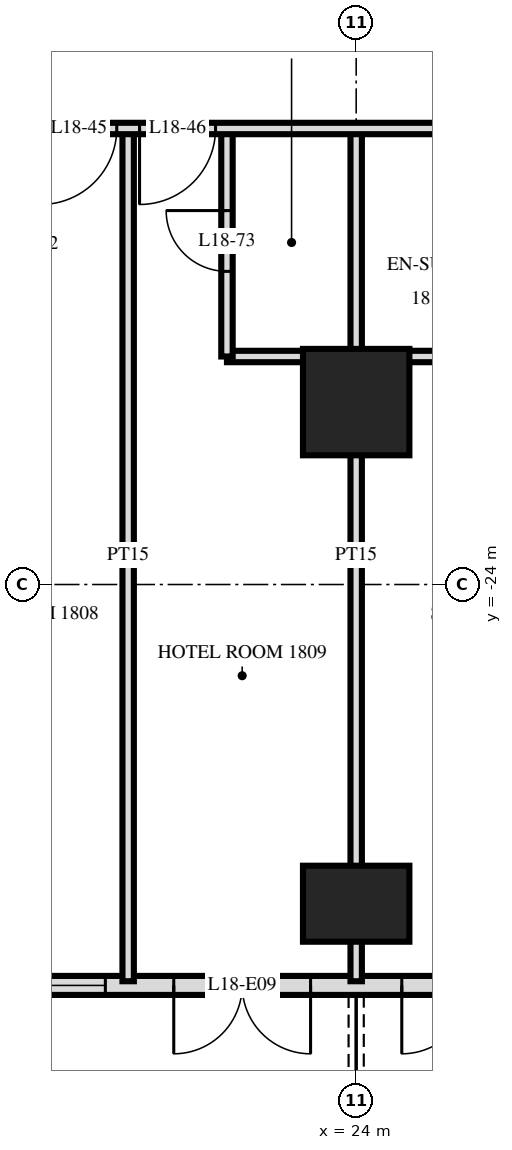
"""IFC4 building model, lengths in metres.
Left out: names, types, materials, properties, quantities, classifications, styles, units other than length and angle.
Written with IfcOpenShell. Run it as: python <this file> out.ifc"""

import sys

from ifc_helpers import new_model, si_unit, direction, frame, frame_2d, origin, origin_2d, place, context, subcontext, project, spatial, rectangle, extrude, element, fill, save


model = new_model("IFC4")
c1 = context("Model", 3, precision=1e-05, world=origin(), true_north=direction((0.0, 1.0)))
c2 = subcontext(c1, "Body", "Model", "MODEL_VIEW")
j1 = project(units=[si_unit("LENGTHUNIT", "METRE"), si_unit("PLANEANGLEUNIT", "RADIAN")], contexts=[c1])
p1 = place(None, origin())
s1 = spatial("IfcSite", under=j1, at=p1, CompositionType="ELEMENT")
p2 = place(p1, origin())
s2 = spatial("IfcBuilding", under=s1, at=p2, CompositionType="ELEMENT")
p3 = place(p2, frame((0.0, 0.0, 74.4)))
s3 = spatial("IfcBuildingStorey", under=s2, at=p3, CompositionType="ELEMENT", Elevation=74.4)
p4 = place(p3, frame((24.0, -28.2, 0.0), z_axis=(0.0, 0.0, 1.0), x_axis=(1.0, 0.0, 0.0)))
e1 = element("IfcColumn", 1, at=p4, inside=s3, PredefinedType="COLUMN", context=c2, shape_type="SweptSolid", body=[
    extrude(rectangle(XDim=1.4, YDim=1.0, at=origin_2d()), origin(), (0.0, 0.0, 1.0), 3.6),
])
p5 = place(p3, frame((24.0, -21.6, 0.0), z_axis=(0.0, 0.0, 1.0), x_axis=(1.0, 0.0, 0.0)))
e2 = element("IfcColumn", 2, at=p5, inside=s3, PredefinedType="COLUMN", context=c2, shape_type="SweptSolid", body=[
    extrude(rectangle(XDim=1.4, YDim=1.4, at=origin_2d()), origin(), (0.0, 0.0, 1.0), 3.6),
])
p6 = place(p3, frame((-28.775, -29.275, 0.0), z_axis=(0.0, 0.0, 1.0), x_axis=(1.0, 0.0, 0.0)))
e3 = element("IfcWall", 3, at=p6, inside=s3, PredefinedType="SOLIDWALL", context=c2, shape_type="SweptSolid", body=[
    extrude(rectangle(XDim=57.551, YDim=0.25, at=frame_2d((28.775, 0.0))), origin(), (0.0, 0.0, 1.0), 3.32),
])
p7 = place(p6, frame((0.575, 0.0, 0.0)))
e4 = element("IfcOpeningElement", 4, at=p7, cuts=e3, PredefinedType="OPENING", context=c2, shape_type="SweptSolid", body=[
    extrude(rectangle(XDim=1.8, YDim=2.4, at=frame_2d((0.9, 1.2))), frame((0.0, 0.135, 0.0), z_axis=(0.0, -1.0, 0.0), x_axis=(1.0, 0.0, 0.0)), (0.0, 0.0, 1.0), 0.27),
])
p8 = place(p6, frame((5.075, 0.0, 0.3)))
e5 = element("IfcOpeningElement", 5, at=p8, cuts=e3, PredefinedType="OPENING", context=c2, shape_type="SweptSolid", body=[
    extrude(rectangle(XDim=2.4, YDim=2.1, at=frame_2d((1.2, 1.05))), frame((0.0, 0.135, 0.0), z_axis=(0.0, -1.0, 0.0), x_axis=(1.0, 0.0, 0.0)), (0.0, 0.0, 1.0), 0.27),
])
p9 = place(p6, frame((8.375, 0.0, 0.0)))
e6 = element("IfcOpeningElement", 6, at=p9, cuts=e3, PredefinedType="OPENING", context=c2, shape_type="SweptSolid", body=[
    extrude(rectangle(XDim=1.8, YDim=2.4, at=frame_2d((0.9, 1.2))), frame((0.0, 0.135, 0.0), z_axis=(0.0, -1.0, 0.0), x_axis=(1.0, 0.0, 0.0)), (0.0, 0.0, 1.0), 0.27),
])
p10 = place(p6, frame((11.375, 0.0, 0.0)))
e7 = element("IfcOpeningElement", 7, at=p10, cuts=e3, PredefinedType="OPENING", context=c2, shape_type="SweptSolid", body=[
    extrude(rectangle(XDim=1.8, YDim=2.4, at=frame_2d((0.9, 1.2))), frame((0.0, 0.135, 0.0), z_axis=(0.0, -1.0, 0.0), x_axis=(1.0, 0.0, 0.0)), (0.0, 0.0, 1.0), 0.27),
])
p11 = place(p6, frame((14.075, 0.0, 0.3)))
e8 = element("IfcOpeningElement", 8, at=p11, cuts=e3, PredefinedType="OPENING", context=c2, shape_type="SweptSolid", body=[
    extrude(rectangle(XDim=2.4, YDim=2.1, at=frame_2d((1.2, 1.05))), frame((0.0, 0.135, 0.0), z_axis=(0.0, -1.0, 0.0), x_axis=(1.0, 0.0, 0.0)), (0.0, 0.0, 1.0), 0.27),
])
p12 = place(p6, frame((17.375, 0.0, 0.0)))
e9 = element("IfcOpeningElement", 9, at=p12, cuts=e3, PredefinedType="OPENING", context=c2, shape_type="SweptSolid", body=[
    extrude(rectangle(XDim=1.8, YDim=2.4, at=frame_2d((0.9, 1.2))), frame((0.0, 0.135, 0.0), z_axis=(0.0, -1.0, 0.0), x_axis=(1.0, 0.0, 0.0)), (0.0, 0.0, 1.0), 0.27),
])
p13 = place(p6, frame((20.075, 0.0, 0.3)))
e10 = element("IfcOpeningElement", 10, at=p13, cuts=e3, PredefinedType="OPENING", context=c2, shape_type="SweptSolid", body=[
    extrude(rectangle(XDim=2.4, YDim=2.1, at=frame_2d((1.2, 1.05))), frame((0.0, 0.135, 0.0), z_axis=(0.0, -1.0, 0.0), x_axis=(1.0, 0.0, 0.0)), (0.0, 0.0, 1.0), 0.27),
])
p14 = place(p6, frame((23.075, 0.0, 0.3)))
e11 = element("IfcOpeningElement", 11, at=p14, cuts=e3, PredefinedType="OPENING", context=c2, shape_type="SweptSolid", body=[
    extrude(rectangle(XDim=2.4, YDim=2.1, at=frame_2d((1.2, 1.05))), frame((0.0, 0.135, 0.0), z_axis=(0.0, -1.0, 0.0), x_axis=(1.0, 0.0, 0.0)), (0.0, 0.0, 1.0), 0.27),
])
p15 = place(p6, frame((26.375, 0.0, 0.0)))
e12 = element("IfcOpeningElement", 12, at=p15, cuts=e3, PredefinedType="OPENING", context=c2, shape_type="SweptSolid", body=[
    extrude(rectangle(XDim=1.8, YDim=2.4, at=frame_2d((0.9, 1.2))), frame((0.0, 0.135, 0.0), z_axis=(0.0, -1.0, 0.0), x_axis=(1.0, 0.0, 0.0)), (0.0, 0.0, 1.0), 0.27),
])
p16 = place(p6, frame((29.375, 0.0, 0.0)))
e13 = element("IfcOpeningElement", 13, at=p16, cuts=e3, PredefinedType="OPENING", context=c2, shape_type="SweptSolid", body=[
    extrude(rectangle(XDim=1.8, YDim=2.4, at=frame_2d((0.9, 1.2))), frame((0.0, 0.135, 0.0), z_axis=(0.0, -1.0, 0.0), x_axis=(1.0, 0.0, 0.0)), (0.0, 0.0, 1.0), 0.27),
])
p17 = place(p6, frame((32.075, 0.0, 0.3)))
e14 = element("IfcOpeningElement", 14, at=p17, cuts=e3, PredefinedType="OPENING", context=c2, shape_type="SweptSolid", body=[
    extrude(rectangle(XDim=2.4, YDim=2.1, at=frame_2d((1.2, 1.05))), frame((0.0, 0.135, 0.0), z_axis=(0.0, -1.0, 0.0), x_axis=(1.0, 0.0, 0.0)), (0.0, 0.0, 1.0), 0.27),
])
p18 = place(p6, frame((35.375, 0.0, 0.0)))
e15 = element("IfcOpeningElement", 15, at=p18, cuts=e3, PredefinedType="OPENING", context=c2, shape_type="SweptSolid", body=[
    extrude(rectangle(XDim=1.8, YDim=2.4, at=frame_2d((0.9, 1.2))), frame((0.0, 0.135, 0.0), z_axis=(0.0, -1.0, 0.0), x_axis=(1.0, 0.0, 0.0)), (0.0, 0.0, 1.0), 0.27),
])
p19 = place(p6, frame((38.075, 0.0, 0.3)))
e16 = element("IfcOpeningElement", 16, at=p19, cuts=e3, PredefinedType="OPENING", context=c2, shape_type="SweptSolid", body=[
    extrude(rectangle(XDim=2.4, YDim=2.1, at=frame_2d((1.2, 1.05))), frame((0.0, 0.135, 0.0), z_axis=(0.0, -1.0, 0.0), x_axis=(1.0, 0.0, 0.0)), (0.0, 0.0, 1.0), 0.27),
])
p20 = place(p6, frame((41.075, 0.0, 0.3)))
e17 = element("IfcOpeningElement", 17, at=p20, cuts=e3, PredefinedType="OPENING", context=c2, shape_type="SweptSolid", body=[
    extrude(rectangle(XDim=2.4, YDim=2.1, at=frame_2d((1.2, 1.05))), frame((0.0, 0.135, 0.0), z_axis=(0.0, -1.0, 0.0), x_axis=(1.0, 0.0, 0.0)), (0.0, 0.0, 1.0), 0.27),
])
p21 = place(p6, frame((44.375, 0.0, 0.0)))
e18 = element("IfcOpeningElement", 18, at=p21, cuts=e3, PredefinedType="OPENING", context=c2, shape_type="SweptSolid", body=[
    extrude(rectangle(XDim=1.8, YDim=2.4, at=frame_2d((0.9, 1.2))), frame((0.0, 0.135, 0.0), z_axis=(0.0, -1.0, 0.0), x_axis=(1.0, 0.0, 0.0)), (0.0, 0.0, 1.0), 0.27),
])
p22 = place(p6, frame((47.075, 0.0, 0.3)))
e19 = element("IfcOpeningElement", 19, at=p22, cuts=e3, PredefinedType="OPENING", context=c2, shape_type="SweptSolid", body=[
    extrude(rectangle(XDim=2.4, YDim=2.1, at=frame_2d((1.2, 1.05))), frame((0.0, 0.135, 0.0), z_axis=(0.0, -1.0, 0.0), x_axis=(1.0, 0.0, 0.0)), (0.0, 0.0, 1.0), 0.27),
])
p23 = place(p6, frame((50.375, 0.0, 0.0)))
e20 = element("IfcOpeningElement", 20, at=p23, cuts=e3, PredefinedType="OPENING", context=c2, shape_type="SweptSolid", body=[
    extrude(rectangle(XDim=1.8, YDim=2.4, at=frame_2d((0.9, 1.2))), frame((0.0, 0.135, 0.0), z_axis=(0.0, -1.0, 0.0), x_axis=(1.0, 0.0, 0.0)), (0.0, 0.0, 1.0), 0.27),
])
p24 = place(p6, frame((53.375, 0.0, 0.0)))
e21 = element("IfcOpeningElement", 21, at=p24, cuts=e3, PredefinedType="OPENING", context=c2, shape_type="SweptSolid", body=[
    extrude(rectangle(XDim=1.8, YDim=2.4, at=frame_2d((0.9, 1.2))), frame((0.0, 0.135, 0.0), z_axis=(0.0, -1.0, 0.0), x_axis=(1.0, 0.0, 0.0)), (0.0, 0.0, 1.0), 0.27),
])
p25 = place(p3, frame((24.0, -29.22, 0.0), z_axis=(0.0, 0.0, 1.0), x_axis=(0.0, 1.0, 0.0)))
e22 = element("IfcWall", 22, at=p25, inside=s3, PredefinedType="PARTITIONING", context=c2, shape_type="SweptSolid", body=[
    extrude(rectangle(XDim=11.22, YDim=0.15, at=frame_2d((5.61, 0.0))), origin(), (0.0, 0.0, 1.0), 3.32),
])
p26 = place(p3, frame((22.3, -21.0, 0.0), z_axis=(0.0, 0.0, 1.0), x_axis=(0.0, 1.0, 0.0)))
e23 = element("IfcWall", 23, at=p26, inside=s3, PredefinedType="PARTITIONING", context=c2, shape_type="SweptSolid", body=[
    extrude(rectangle(XDim=3.0, YDim=0.15, at=frame_2d((1.5, 0.0))), origin(), (0.0, 0.0, 1.0), 3.32),
])
p27 = place(p26, frame((1.12, 0.0, 0.0)))
e24 = element("IfcOpeningElement", 24, at=p27, cuts=e23, PredefinedType="OPENING", context=c2, shape_type="SweptSolid", body=[
    extrude(rectangle(XDim=0.8, YDim=2.1, at=frame_2d((0.4, 1.05))), frame((0.0, 0.085, 0.0), z_axis=(0.0, -1.0, 0.0), x_axis=(1.0, 0.0, 0.0)), (0.0, 0.0, 1.0), 0.17),
])
p28 = place(p3, frame((21.0, -29.22, 0.0), z_axis=(0.0, 0.0, 1.0), x_axis=(0.0, 1.0, 0.0)))
e25 = element("IfcWall", 25, at=p28, inside=s3, PredefinedType="PARTITIONING", context=c2, shape_type="SweptSolid", body=[
    extrude(rectangle(XDim=11.22, YDim=0.15, at=frame_2d((5.61, 0.0))), origin(), (0.0, 0.0, 1.0), 3.32),
])
p29 = place(p3, frame((22.3, -21.0, 0.0), z_axis=(0.0, 0.0, 1.0), x_axis=(1.0, 0.0, 0.0)))
e26 = element("IfcWall", 26, at=p29, inside=s3, PredefinedType="PARTITIONING", context=c2, shape_type="SweptSolid", body=[
    extrude(rectangle(XDim=4.7, YDim=0.15, at=frame_2d((2.35, 0.0))), origin(), (0.0, 0.0, 1.0), 3.32),
])
p30 = place(p3, frame((-33.12, -18.0, 0.0), z_axis=(0.0, 0.0, 1.0), x_axis=(1.0, 0.0, 0.0)))
e27 = element("IfcWall", 27, at=p30, inside=s3, PredefinedType="PARTITIONING", context=c2, shape_type="SweptSolid", body=[
    extrude(rectangle(XDim=66.24, YDim=0.15, at=frame_2d((33.12, 0.0))), origin(), (0.0, 0.0, 1.0), 3.32),
])
p31 = place(p30, frame((15.27, 0.0, 0.0)))
e28 = element("IfcOpeningElement", 28, at=p31, cuts=e27, PredefinedType="OPENING", context=c2, shape_type="SweptSolid", body=[
    extrude(rectangle(XDim=1.0, YDim=2.1, at=frame_2d((0.5, 1.05))), frame((0.0, 0.085, 0.0), z_axis=(0.0, -1.0, 0.0), x_axis=(1.0, 0.0, 0.0)), (0.0, 0.0, 1.0), 0.17),
])
p32 = place(p30, frame((21.22, 0.0, 0.0)))
e29 = element("IfcOpeningElement", 29, at=p32, cuts=e27, PredefinedType="OPENING", context=c2, shape_type="SweptSolid", body=[
    extrude(rectangle(XDim=1.0, YDim=2.1, at=frame_2d((0.5, 1.05))), frame((0.0, 0.085, 0.0), z_axis=(0.0, -1.0, 0.0), x_axis=(1.0, 0.0, 0.0)), (0.0, 0.0, 1.0), 0.17),
])
p33 = place(p30, frame((24.27, 0.0, 0.0)))
e30 = element("IfcOpeningElement", 30, at=p33, cuts=e27, PredefinedType="OPENING", context=c2, shape_type="SweptSolid", body=[
    extrude(rectangle(XDim=1.0, YDim=2.1, at=frame_2d((0.5, 1.05))), frame((0.0, 0.085, 0.0), z_axis=(0.0, -1.0, 0.0), x_axis=(1.0, 0.0, 0.0)), (0.0, 0.0, 1.0), 0.17),
])
p34 = place(p30, frame((30.97, 0.0, 0.0)))
e31 = element("IfcOpeningElement", 31, at=p34, cuts=e27, PredefinedType="OPENING", context=c2, shape_type="SweptSolid", body=[
    extrude(rectangle(XDim=1.0, YDim=2.1, at=frame_2d((0.5, 1.05))), frame((0.0, 0.085, 0.0), z_axis=(0.0, -1.0, 0.0), x_axis=(1.0, 0.0, 0.0)), (0.0, 0.0, 1.0), 0.17),
])
p35 = place(p30, frame((40.42, 0.0, 0.0)))
e32 = element("IfcOpeningElement", 32, at=p35, cuts=e27, PredefinedType="OPENING", context=c2, shape_type="SweptSolid", body=[
    extrude(rectangle(XDim=1.0, YDim=2.1, at=frame_2d((0.5, 1.05))), frame((0.0, 0.085, 0.0), z_axis=(0.0, -1.0, 0.0), x_axis=(1.0, 0.0, 0.0)), (0.0, 0.0, 1.0), 0.17),
])
p36 = place(p30, frame((43.97, 0.0, 0.0)))
e33 = element("IfcOpeningElement", 33, at=p36, cuts=e27, PredefinedType="OPENING", context=c2, shape_type="SweptSolid", body=[
    extrude(rectangle(XDim=1.0, YDim=2.1, at=frame_2d((0.5, 1.05))), frame((0.0, 0.085, 0.0), z_axis=(0.0, -1.0, 0.0), x_axis=(1.0, 0.0, 0.0)), (0.0, 0.0, 1.0), 0.17),
])
p37 = place(p30, frame((45.52, 0.0, 0.0)))
e34 = element("IfcOpeningElement", 34, at=p37, cuts=e27, PredefinedType="OPENING", context=c2, shape_type="SweptSolid", body=[
    extrude(rectangle(XDim=1.0, YDim=2.1, at=frame_2d((0.5, 1.05))), frame((0.0, 0.085, 0.0), z_axis=(0.0, -1.0, 0.0), x_axis=(1.0, 0.0, 0.0)), (0.0, 0.0, 1.0), 0.17),
])
p38 = place(p30, frame((52.97, 0.0, 0.0)))
e35 = element("IfcOpeningElement", 35, at=p38, cuts=e27, PredefinedType="OPENING", context=c2, shape_type="SweptSolid", body=[
    extrude(rectangle(XDim=1.0, YDim=2.1, at=frame_2d((0.5, 1.05))), frame((0.0, 0.085, 0.0), z_axis=(0.0, -1.0, 0.0), x_axis=(1.0, 0.0, 0.0)), (0.0, 0.0, 1.0), 0.17),
])
p39 = place(p30, frame((54.27, 0.0, 0.0)))
e36 = element("IfcOpeningElement", 36, at=p39, cuts=e27, PredefinedType="OPENING", context=c2, shape_type="SweptSolid", body=[
    extrude(rectangle(XDim=1.0, YDim=2.1, at=frame_2d((0.5, 1.05))), frame((0.0, 0.085, 0.0), z_axis=(0.0, -1.0, 0.0), x_axis=(1.0, 0.0, 0.0)), (0.0, 0.0, 1.0), 0.17),
])
p40 = place(p30, frame((13.42, 0.0, 0.0)))
e37 = element("IfcOpeningElement", 37, at=p40, cuts=e27, PredefinedType="OPENING", context=c2, shape_type="SweptSolid", body=[
    extrude(rectangle(XDim=1.0, YDim=2.1, at=frame_2d((0.5, 1.05))), frame((0.0, 0.085, 0.0), z_axis=(0.0, -1.0, 0.0), x_axis=(1.0, 0.0, 0.0)), (0.0, 0.0, 1.0), 0.17),
])
p41 = place(p30, frame((60.82, 0.0, 0.0)))
e38 = element("IfcOpeningElement", 38, at=p41, cuts=e27, PredefinedType="OPENING", context=c2, shape_type="SweptSolid", body=[
    extrude(rectangle(XDim=1.0, YDim=2.1, at=frame_2d((0.5, 1.05))), frame((0.0, 0.085, 0.0), z_axis=(0.0, -1.0, 0.0), x_axis=(1.0, 0.0, 0.0)), (0.0, 0.0, 1.0), 0.17),
])
p42 = place(p22, origin())
e39 = element("IfcWindow", 39, at=p42, inside=s3, PartitioningType="SINGLE_PANEL", PredefinedType="WINDOW", context=c2, shape_type="SweptSolid", body=[
    extrude(rectangle(XDim=2.4, YDim=2.1, at=frame_2d((1.2, 1.05))), frame((0.0, 0.03, 0.0), z_axis=(0.0, -1.0, 0.0), x_axis=(1.0, 0.0, 0.0)), (0.0, 0.0, 1.0), 0.06),
])
fill(e19, e39)
p43 = place(p23, frame((0.9, 0.0, 0.0), z_axis=(0.0, 0.0, 1.0), x_axis=(-1.0, 0.0, 0.0)))
e40 = element("IfcDoor", 40, at=p43, inside=s3, OperationType="DOUBLE_DOOR_SINGLE_SWING", PredefinedType="DOOR", context=c2, shape_type="SweptSolid", body=[
    extrude(rectangle(XDim=1.8, YDim=2.4, at=frame_2d((0.0, 1.2))), frame((0.0, -0.025, 0.0), z_axis=(0.0, 1.0, 0.0), x_axis=(-1.0, 0.0, 0.0)), (0.0, 0.0, 1.0), 0.05),
])
fill(e20, e40)
p44 = place(p24, frame((0.9, 0.0, 0.0), z_axis=(0.0, 0.0, 1.0), x_axis=(-1.0, 0.0, 0.0)))
e41 = element("IfcDoor", 41, at=p44, inside=s3, OperationType="DOUBLE_DOOR_SINGLE_SWING", PredefinedType="DOOR", context=c2, shape_type="SweptSolid", body=[
    extrude(rectangle(XDim=1.8, YDim=2.4, at=frame_2d((0.0, 1.2))), frame((0.0, -0.025, 0.0), z_axis=(0.0, 1.0, 0.0), x_axis=(-1.0, 0.0, 0.0)), (0.0, 0.0, 1.0), 0.05),
])
fill(e21, e41)
p45 = place(p38, frame((0.5, 0.0, 0.0), z_axis=(0.0, 0.0, 1.0), x_axis=(-1.0, 0.0, 0.0)))
e42 = element("IfcDoor", 42, at=p45, inside=s3, OperationType="SINGLE_SWING_LEFT", PredefinedType="DOOR", context=c2, shape_type="SweptSolid", body=[
    extrude(rectangle(XDim=1.0, YDim=2.1, at=frame_2d((0.0, 1.05))), frame((0.0, -0.025, 0.0), z_axis=(0.0, 1.0, 0.0), x_axis=(-1.0, 0.0, 0.0)), (0.0, 0.0, 1.0), 0.05),
])
fill(e35, e42)
p46 = place(p39, frame((0.5, 0.0, 0.0), z_axis=(0.0, 0.0, 1.0), x_axis=(-1.0, 0.0, 0.0)))
e43 = element("IfcDoor", 43, at=p46, inside=s3, OperationType="SINGLE_SWING_LEFT", PredefinedType="DOOR", context=c2, shape_type="SweptSolid", body=[
    extrude(rectangle(XDim=1.0, YDim=2.1, at=frame_2d((0.0, 1.05))), frame((0.0, -0.025, 0.0), z_axis=(0.0, 1.0, 0.0), x_axis=(-1.0, 0.0, 0.0)), (0.0, 0.0, 1.0), 0.05),
])
fill(e36, e43)
p47 = place(p27, origin())
e44 = element("IfcDoor", 44, at=p47, inside=s3, OperationType="SINGLE_SWING_LEFT", PredefinedType="DOOR", context=c2, shape_type="SweptSolid", body=[
    extrude(rectangle(XDim=0.8, YDim=2.1, at=frame_2d((0.4, 1.05))), frame((0.0, 0.025, 0.0), z_axis=(0.0, -1.0, 0.0), x_axis=(1.0, 0.0, 0.0)), (0.0, 0.0, 1.0), 0.05),
])
fill(e24, e44)
save(model, sys.argv[1])
